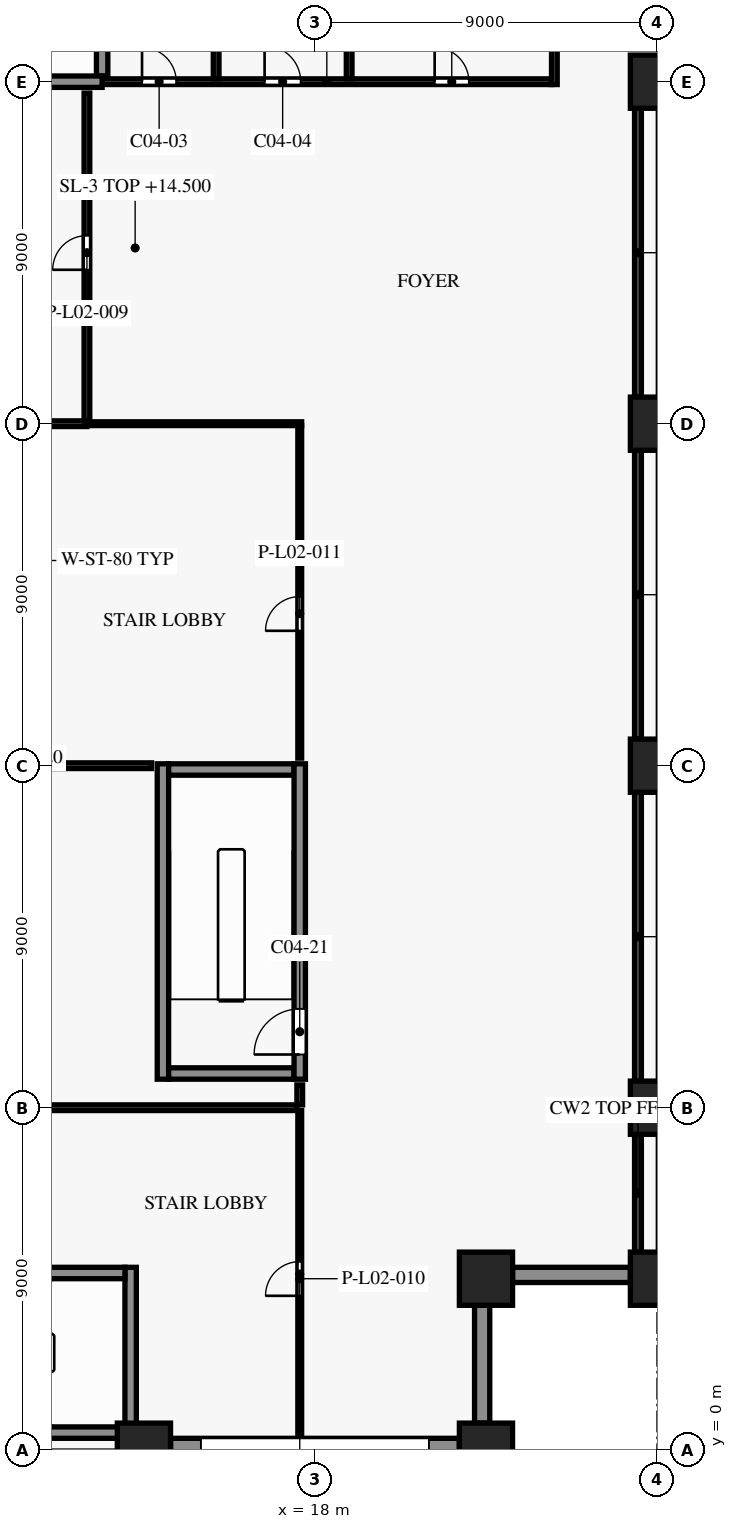
"""IFC4 building model, lengths in metres.
Left out: names, types, materials, properties, quantities, classifications, styles, units other than length and angle.
Written with IfcOpenShell. Run it as: python <this file> out.ifc"""

import sys

from ifc_helpers import new_model, si_unit, direction, frame, frame_2d, origin, origin_2d, place, context, subcontext, project, spatial, rectangle, extrude, element, fill, save


model = new_model("IFC4")
c1 = context("Model", 3, precision=1e-05, world=origin(), true_north=direction((0.0, 1.0)))
c2 = subcontext(c1, "Body", "Model", "MODEL_VIEW")
j1 = project(units=[si_unit("LENGTHUNIT", "METRE"), si_unit("PLANEANGLEUNIT", "RADIAN")], contexts=[c1])
p1 = place(None, origin())
s1 = spatial("IfcSite", under=j1, at=p1, CompositionType="ELEMENT")
p2 = place(p1, origin())
s2 = spatial("IfcBuilding", under=s1, at=p2, CompositionType="ELEMENT")
p3 = place(p2, frame((0.0, 0.0, 14.5)))
s3 = spatial("IfcBuildingStorey", under=s2, at=p3, CompositionType="ELEMENT", Elevation=14.5)
for number, where, z_axis, x_axis in (
    (1, (13.5, 0.0, 0.0), (0.0, 0.0, 1.0), (1.0, 0.0, 0.0)),
    (2, (22.5, 0.0, 0.0), (0.0, 0.0, 1.0), (1.0, 0.0, 0.0)),
    (3, (27.0, 4.5, 0.0), (0.0, 0.0, 1.0), (1.0, 0.0, 0.0)),
    (4, (27.0, 9.0, 0.0), (0.0, 0.0, 1.0), (1.0, 0.0, 0.0)),
    (5, (27.0, 18.0, 0.0), (0.0, 0.0, 1.0), (1.0, 0.0, 0.0)),
    (6, (27.0, 27.0, 0.0), (0.0, 0.0, 1.0), (1.0, 0.0, 0.0)),
    (7, (27.0, 36.0, 0.0), (0.0, 0.0, 1.0), (1.0, 0.0, 0.0)),
    (8, (22.5, 4.5, 0.0), (0.0, 0.0, 1.0), (1.0, 0.0, 0.0)),
):
    element("IfcColumn", number, at=place(p3, frame(where, z_axis=z_axis, x_axis=x_axis)), inside=s3, PredefinedType="COLUMN", context=c2, shape_type="SweptSolid", body=[
        extrude(rectangle(XDim=1.4, YDim=1.4, at=origin_2d()), origin(), (0.0, 0.0, 1.0), 5.0),
    ])
p4 = place(p3, frame((21.8, 0.1, 0.0), z_axis=(0.0, 0.0, 1.0), x_axis=(-1.0, 0.0, 0.0)))
e9 = element("IfcWall", 9, at=p4, inside=s3, PredefinedType="SOLIDWALL", context=c2, shape_type="SweptSolid", body=[
    extrude(rectangle(XDim=7.6, YDim=0.4, at=frame_2d((3.8, 0.0))), origin(), (0.0, 0.0, 1.0), 4.1),
])
p5 = place(p4, frame((0.8, 0.0, 0.9)))
e10 = element("IfcOpeningElement", 10, at=p5, cuts=e9, PredefinedType="OPENING", context=c2, shape_type="SweptSolid", body=[
    extrude(rectangle(XDim=6.0, YDim=1.8, at=frame_2d((3.0, 0.9))), frame((0.0, 0.21, 0.0), z_axis=(0.0, -1.0, 0.0), x_axis=(1.0, 0.0, 0.0)), (0.0, 0.0, 1.0), 0.42),
])
for number, where, z_axis, x_axis in (
    (11, (22.4, 3.8, 0.0), (0.0, 0.0, 1.0), (0.0, -1.0, 0.0)),
    (12, (26.3, 4.6, 0.0), (0.0, 0.0, 1.0), (-1.0, 0.0, 0.0)),
):
    element("IfcWall", number, at=place(p3, frame(where, z_axis=z_axis, x_axis=x_axis)), inside=s3, PredefinedType="SOLIDWALL", context=c2, shape_type="SweptSolid", body=[
        extrude(rectangle(XDim=3.1, YDim=0.4, at=frame_2d((1.55, 0.0))), origin(), (0.0, 0.0, 1.0), 4.1),
    ])
p6 = place(p3, frame((5.0, 0.45, 0.0), z_axis=(0.0, 0.0, 1.0), x_axis=(1.0, 0.0, 0.0)))
e13 = element("IfcWall", 13, at=p6, inside=s3, PredefinedType="SHEAR", context=c2, shape_type="SweptSolid", body=[
    extrude(rectangle(XDim=8.0, YDim=0.3, at=frame_2d((4.0, 0.0))), origin(), (0.0, 0.0, 1.0), 4.7),
])
p7 = place(p3, frame((5.0, 4.65, 0.0), z_axis=(0.0, 0.0, 1.0), x_axis=(1.0, 0.0, 0.0)))
e14 = element("IfcWall", 14, at=p7, inside=s3, PredefinedType="SHEAR", context=c2, shape_type="SweptSolid", body=[
    extrude(rectangle(XDim=8.0, YDim=0.3, at=frame_2d((4.0, 0.0))), origin(), (0.0, 0.0, 1.0), 4.7),
])
p8 = place(p7, frame((0.5, 0.0, 0.0)))
e15 = element("IfcOpeningElement", 15, at=p8, cuts=e14, PredefinedType="OPENING", context=c2, shape_type="SweptSolid", body=[
    extrude(rectangle(XDim=1.2, YDim=2.2, at=frame_2d((0.6, 1.1))), frame((0.0, 0.16, 0.0), z_axis=(0.0, -1.0, 0.0), x_axis=(1.0, 0.0, 0.0)), (0.0, 0.0, 1.0), 0.32),
])
for number, where, z_axis, x_axis in (
    (16, (14.15, 9.9, 0.0), (0.0, 0.0, 1.0), (1.0, 0.0, 0.0)),
    (17, (14.15, 17.9, 0.0), (0.0, 0.0, 1.0), (1.0, 0.0, 0.0)),
):
    element("IfcWall", number, at=place(p3, frame(where, z_axis=z_axis, x_axis=x_axis)), inside=s3, PredefinedType="SHEAR", context=c2, shape_type="SweptSolid", body=[
        extrude(rectangle(XDim=3.3, YDim=0.3, at=frame_2d((1.65, 0.0))), origin(), (0.0, 0.0, 1.0), 4.7),
    ])
p9 = place(p3, frame((12.4, 36.0, 0.0), z_axis=(0.0, 0.0, 1.0), x_axis=(1.0, 0.0, 0.0)))
e18 = element("IfcWall", 18, at=p9, inside=s3, PredefinedType="SHEAR", context=c2, shape_type="SweptSolid", body=[
    extrude(rectangle(XDim=11.825, YDim=0.15, at=frame_2d((5.913, 0.0))), origin(), (0.0, 0.0, 1.0), 4.7),
])
p10 = place(p9, frame((1.05, 0.0, 0.0)))
e19 = element("IfcOpeningElement", 19, at=p10, cuts=e18, PredefinedType="OPENING", context=c2, shape_type="SweptSolid", body=[
    extrude(rectangle(XDim=0.9, YDim=2.1, at=frame_2d((0.45, 1.05))), frame((0.0, 0.085, 0.0), z_axis=(0.0, -1.0, 0.0), x_axis=(1.0, 0.0, 0.0)), (0.0, 0.0, 1.0), 0.17),
])
p11 = place(p9, frame((4.275, 0.0, 0.0)))
e20 = element("IfcOpeningElement", 20, at=p11, cuts=e18, PredefinedType="OPENING", context=c2, shape_type="SweptSolid", body=[
    extrude(rectangle(XDim=0.95, YDim=2.1, at=frame_2d((0.475, 1.05))), frame((0.0, 0.085, 0.0), z_axis=(0.0, -1.0, 0.0), x_axis=(1.0, 0.0, 0.0)), (0.0, 0.0, 1.0), 0.17),
])
p12 = place(p9, frame((8.75, 0.0, 0.0)))
e21 = element("IfcOpeningElement", 21, at=p12, cuts=e18, PredefinedType="OPENING", context=c2, shape_type="SweptSolid", body=[
    extrude(rectangle(XDim=0.9, YDim=2.1, at=frame_2d((0.45, 1.05))), frame((0.0, 0.085, 0.0), z_axis=(0.0, -1.0, 0.0), x_axis=(1.0, 0.0, 0.0)), (0.0, 0.0, 1.0), 0.17),
])
p13 = place(p3, frame((4.4, 36.0, 0.0), z_axis=(0.0, 0.0, 1.0), x_axis=(1.0, 0.0, 0.0)))
e22 = element("IfcWall", 22, at=p13, inside=s3, PredefinedType="SHEAR", context=c2, shape_type="SweptSolid", body=[
    extrude(rectangle(XDim=8.0, YDim=0.3, at=frame_2d((4.0, 0.0))), origin(), (0.0, 0.0, 1.0), 4.7),
])
p14 = place(p13, frame((0.3, 0.0, 0.0)))
e23 = element("IfcOpeningElement", 23, at=p14, cuts=e22, PredefinedType="OPENING", context=c2, shape_type="SweptSolid", body=[
    extrude(rectangle(XDim=1.5, YDim=2.2, at=frame_2d((0.75, 1.1))), frame((0.0, 0.16, 0.0), z_axis=(0.0, -1.0, 0.0), x_axis=(1.0, 0.0, 0.0)), (0.0, 0.0, 1.0), 0.32),
])
p15 = place(p3, frame((12.4, 36.15, 0.0), z_axis=(0.0, 0.0, 1.0), x_axis=(0.0, 1.0, 0.0)))
e24 = element("IfcWall", 24, at=p15, inside=s3, PredefinedType="SHEAR", context=c2, shape_type="SweptSolid", body=[
    extrude(rectangle(XDim=3.725, YDim=0.3, at=frame_2d((1.863, 0.0))), origin(), (0.0, 0.0, 1.0), 4.7),
])
p16 = place(p3, frame((13.15, 0.3, 0.0), z_axis=(0.0, 0.0, 1.0), x_axis=(0.0, 1.0, 0.0)))
e25 = element("IfcWall", 25, at=p16, inside=s3, PredefinedType="SHEAR", context=c2, shape_type="SweptSolid", body=[
    extrude(rectangle(XDim=4.5, YDim=0.3, at=frame_2d((2.25, 0.0))), origin(), (0.0, 0.0, 1.0), 4.7),
])
p17 = place(p3, frame((14.0, 9.75, 0.0), z_axis=(0.0, 0.0, 1.0), x_axis=(0.0, 1.0, 0.0)))
e26 = element("IfcWall", 26, at=p17, inside=s3, PredefinedType="SHEAR", context=c2, shape_type="SweptSolid", body=[
    extrude(rectangle(XDim=8.3, YDim=0.3, at=frame_2d((4.15, 0.0))), origin(), (0.0, 0.0, 1.0), 4.7),
])
p18 = place(p3, frame((15.4, 36.075, 0.0), z_axis=(0.0, 0.0, 1.0), x_axis=(0.0, 1.0, 0.0)))
e27 = element("IfcWall", 27, at=p18, inside=s3, PredefinedType="PARTITIONING", context=c2, shape_type="SweptSolid", body=[
    extrude(rectangle(XDim=3.8, YDim=0.15, at=frame_2d((1.9, 0.0))), origin(), (0.0, 0.0, 1.0), 4.7),
])
p19 = place(p3, frame((17.6, 9.75, 0.0), z_axis=(0.0, 0.0, 1.0), x_axis=(0.0, 1.0, 0.0)))
e28 = element("IfcWall", 28, at=p19, inside=s3, PredefinedType="SHEAR", context=c2, shape_type="SweptSolid", body=[
    extrude(rectangle(XDim=8.3, YDim=0.3, at=frame_2d((4.15, 0.0))), origin(), (0.0, 0.0, 1.0), 4.7),
])
p20 = place(p19, frame((0.65, 0.0, 0.0)))
e29 = element("IfcOpeningElement", 29, at=p20, cuts=e28, PredefinedType="OPENING", context=c2, shape_type="SweptSolid", body=[
    extrude(rectangle(XDim=1.2, YDim=2.2, at=frame_2d((0.6, 1.1))), frame((0.0, 0.16, 0.0), z_axis=(0.0, -1.0, 0.0), x_axis=(1.0, 0.0, 0.0)), (0.0, 0.0, 1.0), 0.32),
])
p21 = place(p3, frame((18.9, 36.075, 0.0), z_axis=(0.0, 0.0, 1.0), x_axis=(0.0, 1.0, 0.0)))
e30 = element("IfcWall", 30, at=p21, inside=s3, PredefinedType="PARTITIONING", context=c2, shape_type="SweptSolid", body=[
    extrude(rectangle(XDim=3.8, YDim=0.15, at=frame_2d((1.9, 0.0))), origin(), (0.0, 0.0, 1.0), 4.7),
])
p22 = place(p3, frame((24.3, 35.925, 0.0), z_axis=(0.0, 0.0, 1.0), x_axis=(0.0, 1.0, 0.0)))
e31 = element("IfcWall", 31, at=p22, inside=s3, PredefinedType="SHEAR", context=c2, shape_type="SweptSolid", body=[
    extrude(rectangle(XDim=4.075, YDim=0.15, at=frame_2d((2.038, 0.0))), origin(), (0.0, 0.0, 1.0), 4.7),
])
p23 = place(p3, frame((17.6, 0.32, 0.0), z_axis=(0.0, 0.0, 1.0), x_axis=(0.0, 1.0, 0.0)))
e32 = element("IfcWall", 32, at=p23, inside=s3, PredefinedType="PARTITIONING", context=c2, shape_type="SweptSolid", body=[
    extrude(rectangle(XDim=8.605, YDim=0.1, at=frame_2d((4.302, 0.0))), origin(), (0.0, 0.0, 1.0), 3.98),
])
p24 = place(p23, frame((3.73, 0.0, 0.0)))
e33 = element("IfcOpeningElement", 33, at=p24, cuts=e32, PredefinedType="OPENING", context=c2, shape_type="SweptSolid", body=[
    extrude(rectangle(XDim=0.9, YDim=2.1, at=frame_2d((0.45, 1.05))), frame((0.0, 0.06, 0.0), z_axis=(0.0, -1.0, 0.0), x_axis=(1.0, 0.0, 0.0)), (0.0, 0.0, 1.0), 0.12),
])
p25 = place(p3, frame((0.72, 9.0, 0.0), z_axis=(0.0, 0.0, 1.0), x_axis=(1.0, 0.0, 0.0)))
e34 = element("IfcWall", 34, at=p25, inside=s3, PredefinedType="PARTITIONING", context=c2, shape_type="SweptSolid", body=[
    extrude(rectangle(XDim=16.805, YDim=0.15, at=frame_2d((8.402, 0.0))), origin(), (0.0, 0.0, 1.0), 3.98),
])
p26 = place(p3, frame((17.6, 9.075, 0.0), z_axis=(0.0, 0.0, 1.0), x_axis=(0.0, 1.0, 0.0)))
e35 = element("IfcWall", 35, at=p26, inside=s3, PredefinedType="PARTITIONING", context=c2, shape_type="SweptSolid", body=[
    extrude(rectangle(XDim=0.525, YDim=0.15, at=frame_2d((0.263, 0.0))), origin(), (0.0, 0.0, 1.0), 3.98),
])
p27 = place(p3, frame((13.7, 18.0, 0.0), z_axis=(0.0, 0.0, 1.0), x_axis=(-1.0, 0.0, 0.0)))
e36 = element("IfcWall", 36, at=p27, inside=s3, PredefinedType="PARTITIONING", context=c2, shape_type="SweptSolid", body=[
    extrude(rectangle(XDim=13.88, YDim=0.15, at=frame_2d((6.94, 0.0))), origin(), (0.0, 0.0, 1.0), 3.98),
])
p28 = place(p27, frame((10.25, 0.0, 0.0)))
e37 = element("IfcOpeningElement", 37, at=p28, cuts=e36, PredefinedType="OPENING", context=c2, shape_type="SweptSolid", body=[
    extrude(rectangle(XDim=0.9, YDim=2.1, at=frame_2d((0.45, 1.05))), frame((0.0, 0.085, 0.0), z_axis=(0.0, -1.0, 0.0), x_axis=(1.0, 0.0, 0.0)), (0.0, 0.0, 1.0), 0.17),
])
p29 = place(p3, frame((17.6, 18.2, 0.0), z_axis=(0.0, 0.0, 1.0), x_axis=(0.0, 1.0, 0.0)))
e38 = element("IfcWall", 38, at=p29, inside=s3, PredefinedType="PARTITIONING", context=c2, shape_type="SweptSolid", body=[
    extrude(rectangle(XDim=8.75, YDim=0.1, at=frame_2d((4.375, 0.0))), origin(), (0.0, 0.0, 1.0), 3.98),
])
p30 = place(p29, frame((3.35, 0.0, 0.0)))
e39 = element("IfcOpeningElement", 39, at=p30, cuts=e38, PredefinedType="OPENING", context=c2, shape_type="SweptSolid", body=[
    extrude(rectangle(XDim=0.9, YDim=2.1, at=frame_2d((0.45, 1.05))), frame((0.0, 0.06, 0.0), z_axis=(0.0, -1.0, 0.0), x_axis=(1.0, 0.0, 0.0)), (0.0, 0.0, 1.0), 0.12),
])
p31 = place(p3, frame((10.9, 27.0, 0.0), z_axis=(0.0, 0.0, 1.0), x_axis=(1.0, 0.0, 0.0)))
e40 = element("IfcWall", 40, at=p31, inside=s3, PredefinedType="PARTITIONING", context=c2, shape_type="SweptSolid", body=[
    extrude(rectangle(XDim=1.1, YDim=0.15, at=frame_2d((0.55, 0.0))), origin(), (0.0, 0.0, 1.0), 3.98),
])
p32 = place(p3, frame((17.65, 27.0, 0.0), z_axis=(0.0, 0.0, 1.0), x_axis=(-1.0, 0.0, 0.0)))
e41 = element("IfcWall", 41, at=p32, inside=s3, PredefinedType="PARTITIONING", context=c2, shape_type="SweptSolid", body=[
    extrude(rectangle(XDim=5.65, YDim=0.1, at=frame_2d((2.825, 0.0))), origin(), (0.0, 0.0, 1.0), 3.98),
])
p33 = place(p3, frame((12.0, 27.075, 0.0), z_axis=(0.0, 0.0, 1.0), x_axis=(0.0, 1.0, 0.0)))
e42 = element("IfcWall", 42, at=p33, inside=s3, PredefinedType="PARTITIONING", context=c2, shape_type="SweptSolid", body=[
    extrude(rectangle(XDim=8.625, YDim=0.15, at=frame_2d((4.312, 0.0))), origin(), (0.0, 0.0, 1.0), 3.98),
])
p34 = place(p33, frame((3.975, 0.0, 0.0)))
e43 = element("IfcOpeningElement", 43, at=p34, cuts=e42, PredefinedType="OPENING", context=c2, shape_type="SweptSolid", body=[
    extrude(rectangle(XDim=0.9, YDim=2.1, at=frame_2d((0.45, 1.05))), frame((0.0, 0.085, 0.0), z_axis=(0.0, -1.0, 0.0), x_axis=(1.0, 0.0, 0.0)), (0.0, 0.0, 1.0), 0.17),
])
p35 = place(p5, origin())
e44 = element("IfcWindow", 44, at=p35, inside=s3, PartitioningType="SINGLE_PANEL", PredefinedType="WINDOW", context=c2, shape_type="SweptSolid", body=[
    extrude(rectangle(XDim=6.0, YDim=1.8, at=frame_2d((3.0, 0.9))), frame((0.0, 0.03, 0.0), z_axis=(0.0, -1.0, 0.0), x_axis=(1.0, 0.0, 0.0)), (0.0, 0.0, 1.0), 0.06),
])
fill(e10, e44)
p36 = place(p10, origin())
e45 = element("IfcDoor", 45, at=p36, inside=s3, OperationType="SINGLE_SWING_RIGHT", PredefinedType="DOOR", context=c2, shape_type="SweptSolid", body=[
    extrude(rectangle(XDim=0.9, YDim=2.1, at=frame_2d((0.45, 1.05))), frame((0.0, 0.025, 0.0), z_axis=(0.0, -1.0, 0.0), x_axis=(1.0, 0.0, 0.0)), (0.0, 0.0, 1.0), 0.05),
])
fill(e19, e45)
p37 = place(p11, origin())
e46 = element("IfcDoor", 46, at=p37, inside=s3, OperationType="SINGLE_SWING_LEFT", PredefinedType="DOOR", context=c2, shape_type="SweptSolid", body=[
    extrude(rectangle(XDim=0.95, YDim=2.1, at=frame_2d((0.475, 1.05))), frame((0.0, 0.025, 0.0), z_axis=(0.0, -1.0, 0.0), x_axis=(1.0, 0.0, 0.0)), (0.0, 0.0, 1.0), 0.05),
])
fill(e20, e46)
p38 = place(p12, origin())
e47 = element("IfcDoor", 47, at=p38, inside=s3, OperationType="SINGLE_SWING_RIGHT", PredefinedType="DOOR", context=c2, shape_type="SweptSolid", body=[
    extrude(rectangle(XDim=0.9, YDim=2.1, at=frame_2d((0.45, 1.05))), frame((0.0, 0.025, 0.0), z_axis=(0.0, -1.0, 0.0), x_axis=(1.0, 0.0, 0.0)), (0.0, 0.0, 1.0), 0.05),
])
fill(e21, e47)
p39 = place(p20, origin())
e48 = element("IfcDoor", 48, at=p39, inside=s3, OperationType="SINGLE_SWING_LEFT", PredefinedType="DOOR", context=c2, shape_type="SweptSolid", body=[
    extrude(rectangle(XDim=1.2, YDim=2.2, at=frame_2d((0.6, 1.1))), frame((0.0, 0.025, 0.0), z_axis=(0.0, -1.0, 0.0), x_axis=(1.0, 0.0, 0.0)), (0.0, 0.0, 1.0), 0.05),
])
fill(e29, e48)
p40 = place(p34, origin())
e49 = element("IfcDoor", 49, at=p40, inside=s3, OperationType="SINGLE_SWING_RIGHT", PredefinedType="DOOR", context=c2, shape_type="SweptSolid", body=[
    extrude(rectangle(XDim=0.9, YDim=2.1, at=frame_2d((0.45, 1.05))), frame((0.0, 0.025, 0.0), z_axis=(0.0, -1.0, 0.0), x_axis=(1.0, 0.0, 0.0)), (0.0, 0.0, 1.0), 0.05),
])
fill(e43, e49)
p41 = place(p24, origin())
e50 = element("IfcDoor", 50, at=p41, inside=s3, OperationType="SINGLE_SWING_LEFT", PredefinedType="DOOR", context=c2, shape_type="SweptSolid", body=[
    extrude(rectangle(XDim=0.9, YDim=2.1, at=frame_2d((0.45, 1.05))), frame((0.0, 0.025, 0.0), z_axis=(0.0, -1.0, 0.0), x_axis=(1.0, 0.0, 0.0)), (0.0, 0.0, 1.0), 0.05),
])
fill(e33, e50)
p42 = place(p30, origin())
e51 = element("IfcDoor", 51, at=p42, inside=s3, OperationType="SINGLE_SWING_LEFT", PredefinedType="DOOR", context=c2, shape_type="SweptSolid", body=[
    extrude(rectangle(XDim=0.9, YDim=2.1, at=frame_2d((0.45, 1.05))), frame((0.0, 0.025, 0.0), z_axis=(0.0, -1.0, 0.0), x_axis=(1.0, 0.0, 0.0)), (0.0, 0.0, 1.0), 0.05),
])
fill(e39, e51)
save(model, sys.argv[1])
